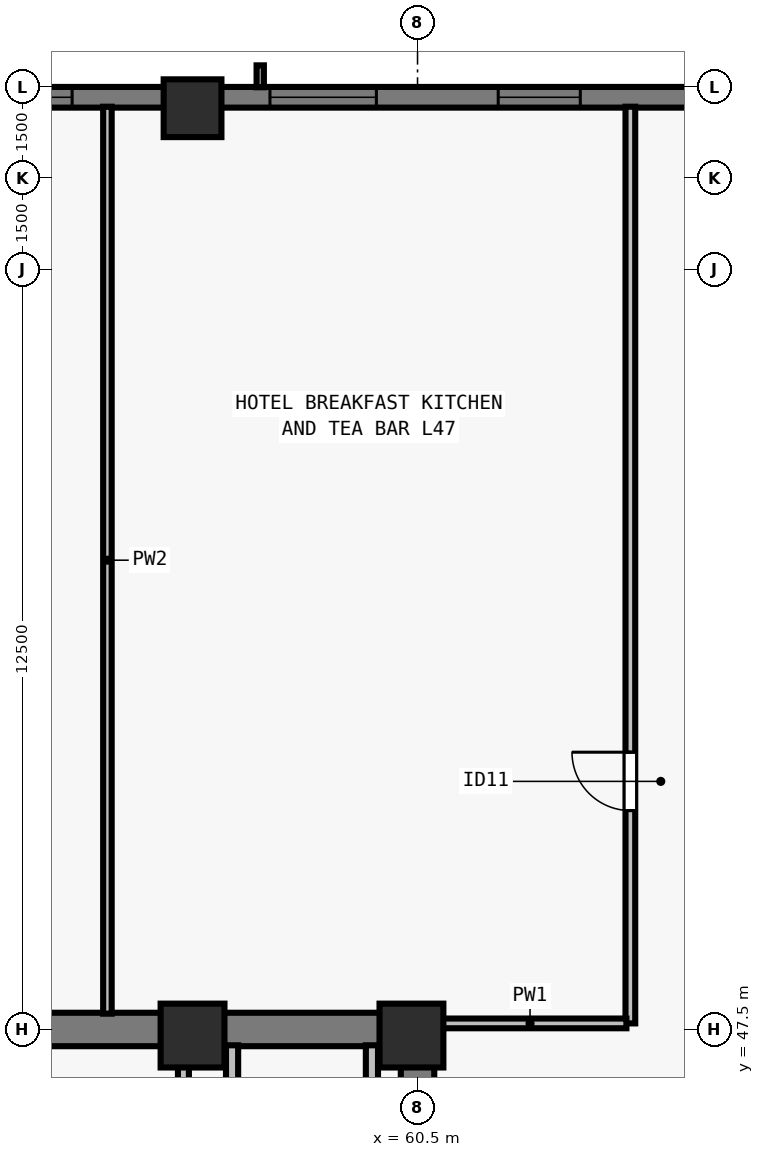
"""IFC4 building model, lengths in metres.
Left out: names, types, materials, properties, quantities, classifications, styles, units other than length and angle.
Written with IfcOpenShell. Run it as: python <this file> out.ifc"""

import sys

from ifc_helpers import new_model, si_unit, direction, frame, frame_2d, origin, origin_2d, place, context, subcontext, project, spatial, rectangle, extrude, element, fill, save


model = new_model("IFC4")
c1 = context("Model", 3, precision=1e-05, world=origin(), true_north=direction((0.0, 1.0)))
c2 = subcontext(c1, "Body", "Model", "MODEL_VIEW")
j1 = project(units=[si_unit("LENGTHUNIT", "METRE"), si_unit("PLANEANGLEUNIT", "RADIAN")], contexts=[c1])
p1 = place(None, origin())
s1 = spatial("IfcSite", under=j1, at=p1, CompositionType="ELEMENT")
p2 = place(p1, origin())
s2 = spatial("IfcBuilding", under=s1, at=p2, CompositionType="ELEMENT")
p3 = place(p2, frame((0.0, 0.0, 172.5)))
s3 = spatial("IfcBuildingStorey", under=s2, at=p3, CompositionType="ELEMENT", Elevation=172.5)
for number, where, z_axis, x_axis in (
    (1, (56.8, 47.4, 0.0), (0.0, 0.0, 1.0), (1.0, 0.0, 0.0)),
    (2, (60.4, 47.4, 0.0), (0.0, 0.0, 1.0), (1.0, 0.0, 0.0)),
):
    element("IfcColumn", number, at=place(p3, frame(where, z_axis=z_axis, x_axis=x_axis)), inside=s3, PredefinedType="COLUMN", context=c2, shape_type="SweptSolid", body=[
        extrude(rectangle(XDim=1.05, YDim=1.05, at=origin_2d()), origin(), (0.0, 0.0, 1.0), 3.5),
    ])
p4 = place(p3, frame((56.8, 62.65, 0.0), z_axis=(0.0, 0.0, 1.0), x_axis=(1.0, 0.0, 0.0)))
e3 = element("IfcColumn", 3, at=p4, inside=s3, PredefinedType="COLUMN", context=c2, shape_type="SweptSolid", body=[
    extrude(rectangle(XDim=0.95, YDim=0.95, at=origin_2d()), origin(), (0.0, 0.0, 1.0), 3.5),
])
p5 = place(p3, frame((32.0, 62.83, 0.0), z_axis=(0.0, 0.0, 1.0), x_axis=(1.0, 0.0, 0.0)))
e4 = element("IfcWall", 4, at=p5, inside=s3, PredefinedType="SOLIDWALL", context=c2, shape_type="SweptSolid", body=[
    extrude(rectangle(XDim=39.682, YDim=0.34, at=frame_2d((19.841, 0.0))), origin(), (0.0, 0.0, 1.0), 3.28),
])
p6 = place(p5, frame((4.752, 0.0, 0.8)))
e5 = element("IfcOpeningElement", 5, at=p6, cuts=e4, PredefinedType="OPENING", context=c2, shape_type="SweptSolid", body=[
    extrude(rectangle(XDim=1.75, YDim=1.66, at=frame_2d((0.875, 0.83))), frame((0.0, 0.18, 0.0), z_axis=(0.0, -1.0, 0.0), x_axis=(1.0, 0.0, 0.0)), (0.0, 0.0, 1.0), 0.36),
])
p7 = place(p5, frame((8.055, 0.0, 0.8)))
e6 = element("IfcOpeningElement", 6, at=p7, cuts=e4, PredefinedType="OPENING", context=c2, shape_type="SweptSolid", body=[
    extrude(rectangle(XDim=1.35, YDim=1.66, at=frame_2d((0.675, 0.83))), frame((0.0, 0.18, 0.0), z_axis=(0.0, -1.0, 0.0), x_axis=(1.0, 0.0, 0.0)), (0.0, 0.0, 1.0), 0.36),
])
p8 = place(p5, frame((11.859, 0.0, 0.8)))
e7 = element("IfcOpeningElement", 7, at=p8, cuts=e4, PredefinedType="OPENING", context=c2, shape_type="SweptSolid", body=[
    extrude(rectangle(XDim=1.75, YDim=1.66, at=frame_2d((0.875, 0.83))), frame((0.0, 0.18, 0.0), z_axis=(0.0, -1.0, 0.0), x_axis=(1.0, 0.0, 0.0)), (0.0, 0.0, 1.0), 0.36),
])
p9 = place(p5, frame((18.966, 0.0, 0.8)))
e8 = element("IfcOpeningElement", 8, at=p9, cuts=e4, PredefinedType="OPENING", context=c2, shape_type="SweptSolid", body=[
    extrude(rectangle(XDim=1.75, YDim=1.66, at=frame_2d((0.875, 0.83))), frame((0.0, 0.18, 0.0), z_axis=(0.0, -1.0, 0.0), x_axis=(1.0, 0.0, 0.0)), (0.0, 0.0, 1.0), 0.36),
])
p10 = place(p5, frame((21.469, 0.0, 0.8)))
e9 = element("IfcOpeningElement", 9, at=p10, cuts=e4, PredefinedType="OPENING", context=c2, shape_type="SweptSolid", body=[
    extrude(rectangle(XDim=1.35, YDim=1.66, at=frame_2d((0.675, 0.83))), frame((0.0, 0.18, 0.0), z_axis=(0.0, -1.0, 0.0), x_axis=(1.0, 0.0, 0.0)), (0.0, 0.0, 1.0), 0.36),
])
p11 = place(p5, frame((26.073, 0.0, 0.8)))
e10 = element("IfcOpeningElement", 10, at=p11, cuts=e4, PredefinedType="OPENING", context=c2, shape_type="SweptSolid", body=[
    extrude(rectangle(XDim=1.75, YDim=1.66, at=frame_2d((0.875, 0.83))), frame((0.0, 0.18, 0.0), z_axis=(0.0, -1.0, 0.0), x_axis=(1.0, 0.0, 0.0)), (0.0, 0.0, 1.0), 0.36),
])
p12 = place(p5, frame((29.827, 0.0, 0.8)))
e11 = element("IfcOpeningElement", 11, at=p12, cuts=e4, PredefinedType="OPENING", context=c2, shape_type="SweptSolid", body=[
    extrude(rectangle(XDim=1.35, YDim=1.66, at=frame_2d((0.675, 0.83))), frame((0.0, 0.18, 0.0), z_axis=(0.0, -1.0, 0.0), x_axis=(1.0, 0.0, 0.0)), (0.0, 0.0, 1.0), 0.36),
])
p13 = place(p5, frame((34.47, 0.0, 0.8)))
e12 = element("IfcOpeningElement", 12, at=p13, cuts=e4, PredefinedType="OPENING", context=c2, shape_type="SweptSolid", body=[
    extrude(rectangle(XDim=0.9, YDim=1.66, at=frame_2d((0.45, 0.83))), frame((0.0, 0.18, 0.0), z_axis=(0.0, -1.0, 0.0), x_axis=(1.0, 0.0, 0.0)), (0.0, 0.0, 1.0), 0.36),
])
p14 = place(p3, frame((43.225, 47.5, 0.0), z_axis=(0.0, 0.0, 1.0), x_axis=(1.0, 0.0, 0.0)))
e13 = element("IfcWall", 13, at=p14, inside=s3, PredefinedType="SHEAR", context=c2, shape_type="SweptSolid", body=[
    extrude(rectangle(XDim=17.55, YDim=0.55, at=frame_2d((8.775, 0.0))), origin(), (0.0, 0.0, 1.0), 3.28),
])
p15 = place(p3, frame((60.5, 40.8, 0.0), z_axis=(0.0, 0.0, 1.0), x_axis=(0.0, 1.0, 0.0)))
e14 = element("IfcWall", 14, at=p15, inside=s3, PredefinedType="SHEAR", context=c2, shape_type="SweptSolid", body=[
    extrude(rectangle(XDim=6.435, YDim=0.55, at=frame_2d((3.218, 0.0))), origin(), (0.0, 0.0, 1.0), 3.28),
])
for number, where, z_axis, x_axis in (
    (15, (57.45, 43.735, 0.0), (0.0, 0.0, 1.0), (0.0, 1.0, 0.0)),
    (16, (59.75, 43.735, 0.0), (0.0, 0.0, 1.0), (0.0, 1.0, 0.0)),
):
    element("IfcWall", number, at=place(p3, frame(where, z_axis=z_axis, x_axis=x_axis)), inside=s3, PredefinedType="SOLIDWALL", context=c2, shape_type="SweptSolid", body=[
        extrude(rectangle(XDim=3.505, YDim=0.2, at=frame_2d((1.752, 0.0))), origin(), (0.0, 0.0, 1.0), 3.28),
    ])
p16 = place(p3, frame((56.65, 43.735, 0.0), z_axis=(0.0, 0.0, 1.0), x_axis=(0.0, 1.0, 0.0)))
e17 = element("IfcWall", 17, at=p16, inside=s3, PredefinedType="SOLIDWALL", context=c2, shape_type="SweptSolid", body=[
    extrude(rectangle(XDim=3.505, YDim=0.18, at=frame_2d((1.752, 0.0))), origin(), (0.0, 0.0, 1.0), 3.28),
])
p17 = place(p3, frame((64.0, 47.6, 0.0), z_axis=(0.0, 0.0, 1.0), x_axis=(0.0, 1.0, 0.0)))
e18 = element("IfcWall", 18, at=p17, inside=s3, PredefinedType="PARTITIONING", context=c2, shape_type="SweptSolid", body=[
    extrude(rectangle(XDim=15.075, YDim=0.16, at=frame_2d((7.538, 0.0))), origin(), (0.0, 0.0, 1.0), 2.555),
])
p18 = place(p17, frame((3.5, 0.0, 0.0)))
e19 = element("IfcOpeningElement", 19, at=p18, cuts=e18, PredefinedType="OPENING", context=c2, shape_type="SweptSolid", body=[
    extrude(rectangle(XDim=0.96, YDim=2.12, at=frame_2d((0.48, 1.06))), frame((0.0, 0.09, 0.0), z_axis=(0.0, -1.0, 0.0), x_axis=(1.0, 0.0, 0.0)), (0.0, 0.0, 1.0), 0.18),
])
p19 = place(p3, frame((60.765, 47.6, 0.0), z_axis=(0.0, 0.0, 1.0), x_axis=(1.0, 0.0, 0.0)))
e20 = element("IfcWall", 20, at=p19, inside=s3, PredefinedType="PARTITIONING", context=c2, shape_type="SweptSolid", body=[
    extrude(rectangle(XDim=3.17, YDim=0.16, at=frame_2d((1.585, 0.0))), origin(), (0.0, 0.0, 1.0), 3.28),
])
p20 = place(p3, frame((55.4, 47.76, 0.0), z_axis=(0.0, 0.0, 1.0), x_axis=(0.0, 1.0, 0.0)))
e21 = element("IfcWall", 21, at=p20, inside=s3, PredefinedType="PARTITIONING", context=c2, shape_type="SweptSolid", body=[
    extrude(rectangle(XDim=14.915, YDim=0.14, at=frame_2d((7.458, 0.0))), origin(), (0.0, 0.0, 1.0), 2.896),
])
p21 = place(p10, origin())
e22 = element("IfcWindow", 22, at=p21, inside=s3, PartitioningType="SINGLE_PANEL", PredefinedType="WINDOW", context=c2, shape_type="SweptSolid", body=[
    extrude(rectangle(XDim=1.35, YDim=1.66, at=frame_2d((0.675, 0.83))), frame((0.0, -0.05, 0.0), z_axis=(0.0, -1.0, 0.0), x_axis=(1.0, 0.0, 0.0)), (0.0, 0.0, 1.0), 0.06),
])
fill(e9, e22)
p22 = place(p11, origin())
e23 = element("IfcWindow", 23, at=p22, inside=s3, PartitioningType="SINGLE_PANEL", PredefinedType="WINDOW", context=c2, shape_type="SweptSolid", body=[
    extrude(rectangle(XDim=1.75, YDim=1.66, at=frame_2d((0.875, 0.83))), frame((0.0, -0.05, 0.0), z_axis=(0.0, -1.0, 0.0), x_axis=(1.0, 0.0, 0.0)), (0.0, 0.0, 1.0), 0.06),
])
fill(e10, e23)
p23 = place(p12, origin())
e24 = element("IfcWindow", 24, at=p23, inside=s3, PartitioningType="SINGLE_PANEL", PredefinedType="WINDOW", context=c2, shape_type="SweptSolid", body=[
    extrude(rectangle(XDim=1.35, YDim=1.66, at=frame_2d((0.675, 0.83))), frame((0.0, -0.05, 0.0), z_axis=(0.0, -1.0, 0.0), x_axis=(1.0, 0.0, 0.0)), (0.0, 0.0, 1.0), 0.06),
])
fill(e11, e24)
p24 = place(p18, origin())
e25 = element("IfcDoor", 25, at=p24, inside=s3, OperationType="SINGLE_SWING_RIGHT", PredefinedType="DOOR", context=c2, shape_type="SweptSolid", body=[
    extrude(rectangle(XDim=0.96, YDim=2.12, at=frame_2d((0.48, 1.06))), frame((0.0, 0.025, 0.0), z_axis=(0.0, -1.0, 0.0), x_axis=(1.0, 0.0, 0.0)), (0.0, 0.0, 1.0), 0.05),
])
fill(e19, e25)
save(model, sys.argv[1])
